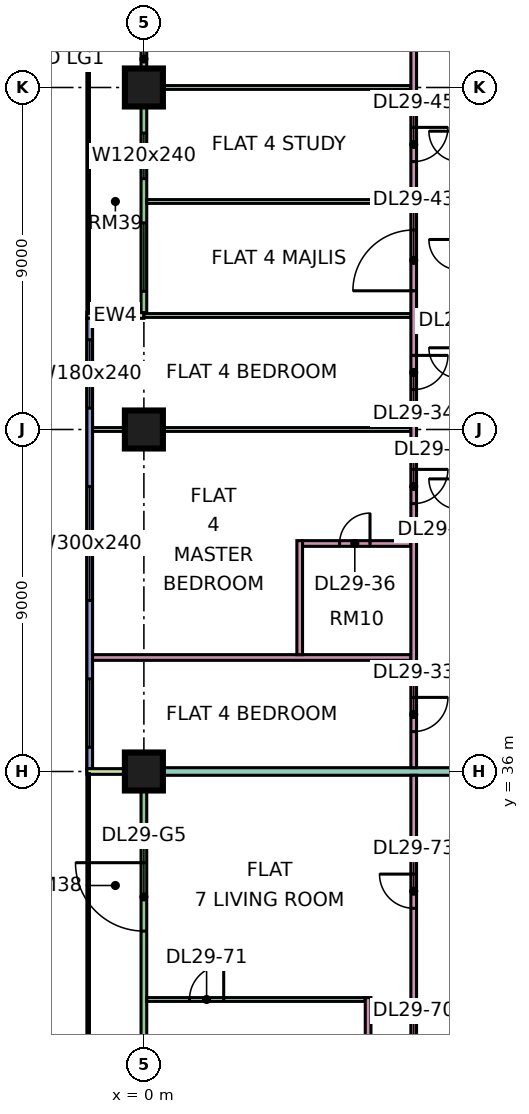
"""IFC4 building model, lengths in metres.
Left out: names, types, materials, properties, quantities, classifications, styles, units other than length and angle.
Written with IfcOpenShell. Run it as: python <this file> out.ifc"""

import sys

from ifc_helpers import new_model, si_unit, direction, frame, frame_2d, origin, origin_2d, place, context, subcontext, project, spatial, rectangle, extrude, element, fill, save


model = new_model("IFC4")
c1 = context("Model", 3, precision=1e-05, world=origin(), true_north=direction((0.0, 1.0)))
c2 = subcontext(c1, "Body", "Model", "MODEL_VIEW")
j1 = project(units=[si_unit("LENGTHUNIT", "METRE"), si_unit("PLANEANGLEUNIT", "RADIAN")], contexts=[c1])
p1 = place(None, origin())
s1 = spatial("IfcSite", under=j1, at=p1, CompositionType="ELEMENT")
p2 = place(p1, origin())
s2 = spatial("IfcBuilding", under=s1, at=p2, CompositionType="ELEMENT")
p3 = place(p2, frame((0.0, 0.0, 125.65)))
s3 = spatial("IfcBuildingStorey", under=s2, at=p3, CompositionType="ELEMENT", Elevation=125.65)
p4 = place(p3, frame((0.0, 36.0, 0.0), z_axis=(0.0, 0.0, 1.0), x_axis=(1.0, 0.0, 0.0)))
e1 = element("IfcColumn", 1, at=p4, inside=s3, PredefinedType="COLUMN", context=c2, shape_type="SweptSolid", body=[
    extrude(rectangle(XDim=1.0, YDim=1.0, at=origin_2d()), origin(), (0.0, 0.0, 1.0), 3.75),
])
for number, where, z_axis, x_axis in (
    (2, (0.0, 45.0, 0.0), (0.0, 0.0, 1.0), (1.0, 0.0, 0.0)),
    (3, (0.0, 54.0, 0.0), (0.0, 0.0, 1.0), (1.0, 0.0, 0.0)),
):
    element("IfcColumn", number, at=place(p3, frame(where, z_axis=z_axis, x_axis=x_axis)), inside=s3, PredefinedType="COLUMN", context=c2, shape_type="SweptSolid", body=[
        extrude(rectangle(XDim=1.0, YDim=1.0, at=origin_2d()), origin(), (0.0, 0.0, 1.0), 3.75),
    ])
p5 = place(p3, frame((0.0, 61.425, 0.0), z_axis=(0.0, 0.0, 1.0), x_axis=(0.0, -1.0, 0.0)))
e4 = element("IfcWall", 4, at=p5, inside=s3, PredefinedType="SOLIDWALL", context=c2, shape_type="SweptSolid", body=[
    extrude(rectangle(XDim=13.35, YDim=0.15, at=frame_2d((6.675, 0.0))), origin(), (0.0, 0.0, 1.0), 3.35),
])
p6 = place(p5, frame((0.262, 0.0, 0.45)))
e5 = element("IfcOpeningElement", 5, at=p6, cuts=e4, PredefinedType="OPENING", context=c2, shape_type="SweptSolid", body=[
    extrude(rectangle(XDim=0.9, YDim=2.4, at=frame_2d((0.45, 1.2))), frame((0.0, 0.085, 0.0), z_axis=(0.0, -1.0, 0.0), x_axis=(1.0, 0.0, 0.0)), (0.0, 0.0, 1.0), 0.17),
])
p7 = place(p5, frame((3.225, 0.0, 0.0)))
e6 = element("IfcOpeningElement", 6, at=p7, cuts=e4, PredefinedType="OPENING", context=c2, shape_type="SweptSolid", body=[
    extrude(rectangle(XDim=1.8, YDim=2.4, at=frame_2d((0.9, 1.2))), frame((0.0, 0.085, 0.0), z_axis=(0.0, -1.0, 0.0), x_axis=(1.0, 0.0, 0.0)), (0.0, 0.0, 1.0), 0.17),
])
p8 = place(p5, frame((8.625, 0.0, 0.45)))
e7 = element("IfcOpeningElement", 7, at=p8, cuts=e4, PredefinedType="OPENING", context=c2, shape_type="SweptSolid", body=[
    extrude(rectangle(XDim=1.2, YDim=2.4, at=frame_2d((0.6, 1.2))), frame((0.0, 0.085, 0.0), z_axis=(0.0, -1.0, 0.0), x_axis=(1.0, 0.0, 0.0)), (0.0, 0.0, 1.0), 0.17),
])
p9 = place(p5, frame((10.988, 0.0, 0.45)))
e8 = element("IfcOpeningElement", 8, at=p9, cuts=e4, PredefinedType="OPENING", context=c2, shape_type="SweptSolid", body=[
    extrude(rectangle(XDim=1.8, YDim=2.4, at=frame_2d((0.9, 1.2))), frame((0.0, 0.085, 0.0), z_axis=(0.0, -1.0, 0.0), x_axis=(1.0, 0.0, 0.0)), (0.0, 0.0, 1.0), 0.17),
])
p10 = place(p3, frame((-1.5, 48.0, 0.0), z_axis=(0.0, 0.0, 1.0), x_axis=(1.0, 0.0, 0.0)))
e9 = element("IfcWall", 9, at=p10, inside=s3, PredefinedType="SOLIDWALL", context=c2, shape_type="SweptSolid", body=[
    extrude(rectangle(XDim=1.5, YDim=0.15, at=frame_2d((0.75, 0.0))), origin(), (0.0, 0.0, 1.0), 3.35),
])
p11 = place(p3, frame((-1.425, 47.925, 0.0), z_axis=(0.0, 0.0, 1.0), x_axis=(0.0, -1.0, 0.0)))
e10 = element("IfcWall", 10, at=p11, inside=s3, PredefinedType="SOLIDWALL", context=c2, shape_type="SweptSolid", body=[
    extrude(rectangle(XDim=11.85, YDim=0.15, at=frame_2d((5.925, 0.0))), origin(), (0.0, 0.0, 1.0), 3.35),
])
p12 = place(p11, frame((0.562, 0.0, 0.45)))
e11 = element("IfcOpeningElement", 11, at=p12, cuts=e10, PredefinedType="OPENING", context=c2, shape_type="SweptSolid", body=[
    extrude(rectangle(XDim=1.8, YDim=2.4, at=frame_2d((0.9, 1.2))), frame((0.0, 0.085, 0.0), z_axis=(0.0, -1.0, 0.0), x_axis=(1.0, 0.0, 0.0)), (0.0, 0.0, 1.0), 0.17),
])
p13 = place(p11, frame((4.425, 0.0, 0.45)))
e12 = element("IfcOpeningElement", 12, at=p13, cuts=e10, PredefinedType="OPENING", context=c2, shape_type="SweptSolid", body=[
    extrude(rectangle(XDim=3.0, YDim=2.4, at=frame_2d((1.5, 1.2))), frame((0.0, 0.085, 0.0), z_axis=(0.0, -1.0, 0.0), x_axis=(1.0, 0.0, 0.0)), (0.0, 0.0, 1.0), 0.17),
])
p14 = place(p11, frame((9.488, 0.0, 0.45)))
e13 = element("IfcOpeningElement", 13, at=p14, cuts=e10, PredefinedType="OPENING", context=c2, shape_type="SweptSolid", body=[
    extrude(rectangle(XDim=1.8, YDim=2.4, at=frame_2d((0.9, 1.2))), frame((0.0, 0.085, 0.0), z_axis=(0.0, -1.0, 0.0), x_axis=(1.0, 0.0, 0.0)), (0.0, 0.0, 1.0), 0.17),
])
p15 = place(p3, frame((0.0, 35.925, 0.0), z_axis=(0.0, 0.0, 1.0), x_axis=(0.0, -1.0, 0.0)))
e14 = element("IfcWall", 14, at=p15, inside=s3, PredefinedType="SOLIDWALL", context=c2, shape_type="SweptSolid", body=[
    extrude(rectangle(XDim=11.85, YDim=0.15, at=frame_2d((5.925, 0.0))), origin(), (0.0, 0.0, 1.0), 3.35),
])
p16 = place(p15, frame((2.325, 0.0, 0.0)))
e15 = element("IfcOpeningElement", 15, at=p16, cuts=e14, PredefinedType="OPENING", context=c2, shape_type="SweptSolid", body=[
    extrude(rectangle(XDim=1.8, YDim=2.4, at=frame_2d((0.9, 1.2))), frame((0.0, 0.085, 0.0), z_axis=(0.0, -1.0, 0.0), x_axis=(1.0, 0.0, 0.0)), (0.0, 0.0, 1.0), 0.17),
])
p17 = place(p15, frame((7.125, 0.0, 0.45)))
e16 = element("IfcOpeningElement", 16, at=p17, cuts=e14, PredefinedType="OPENING", context=c2, shape_type="SweptSolid", body=[
    extrude(rectangle(XDim=3.0, YDim=2.4, at=frame_2d((1.5, 1.2))), frame((0.0, 0.085, 0.0), z_axis=(0.0, -1.0, 0.0), x_axis=(1.0, 0.0, 0.0)), (0.0, 0.0, 1.0), 0.17),
])
p18 = place(p3, frame((-1.5, 36.0, 0.0), z_axis=(0.0, 0.0, 1.0), x_axis=(1.0, 0.0, 0.0)))
e17 = element("IfcWall", 17, at=p18, inside=s3, PredefinedType="SOLIDWALL", context=c2, shape_type="SweptSolid", body=[
    extrude(rectangle(XDim=1.5, YDim=0.15, at=frame_2d((0.75, 0.0))), origin(), (0.0, 0.0, 1.0), 3.35),
])
p19 = place(p3, frame((-1.351, 39.0, 0.0), z_axis=(0.0, 0.0, 1.0), x_axis=(1.0, 0.0, 0.0)))
e18 = element("IfcWall", 18, at=p19, inside=s3, PredefinedType="PARTITIONING", context=c2, shape_type="SweptSolid", body=[
    extrude(rectangle(XDim=8.376, YDim=0.15, at=frame_2d((4.188, 0.0))), origin(), (0.0, 0.0, 1.0), 3.35),
])
p20 = place(p3, frame((-1.351, 45.0, 0.0), z_axis=(0.0, 0.0, 1.0), x_axis=(1.0, 0.0, 0.0)))
e19 = element("IfcWall", 19, at=p20, inside=s3, PredefinedType="PARTITIONING", context=c2, shape_type="SweptSolid", body=[
    extrude(rectangle(XDim=8.376, YDim=0.1, at=frame_2d((4.188, 0.0))), origin(), (0.0, 0.0, 1.0), 3.35),
])
e20 = element("IfcWall", 20, at=p4, inside=s3, PredefinedType="PARTITIONING", context=c2, shape_type="SweptSolid", body=[
    extrude(rectangle(XDim=12.4, YDim=0.2, at=frame_2d((6.2, 0.0))), origin(), (0.0, 0.0, 1.0), 3.35),
])
p21 = place(p3, frame((0.0, 48.0, 0.0), z_axis=(0.0, 0.0, 1.0), x_axis=(1.0, 0.0, 0.0)))
e21 = element("IfcWall", 21, at=p21, inside=s3, PredefinedType="PARTITIONING", context=c2, shape_type="SweptSolid", body=[
    extrude(rectangle(XDim=7.025, YDim=0.1, at=frame_2d((3.512, 0.0))), origin(), (0.0, 0.0, 1.0), 3.35),
])
p22 = place(p3, frame((0.074, 30.0, 0.0), z_axis=(0.0, 0.0, 1.0), x_axis=(1.0, 0.0, 0.0)))
e22 = element("IfcWall", 22, at=p22, inside=s3, PredefinedType="PARTITIONING", context=c2, shape_type="SweptSolid", body=[
    extrude(rectangle(XDim=5.751, YDim=0.1, at=frame_2d((2.875, 0.0))), origin(), (0.0, 0.0, 1.0), 3.35),
])
p23 = place(p22, frame((1.126, 0.0, 0.0)))
e23 = element("IfcOpeningElement", 23, at=p23, cuts=e22, PredefinedType="OPENING", context=c2, shape_type="SweptSolid", body=[
    extrude(rectangle(XDim=0.9, YDim=2.1, at=frame_2d((0.45, 1.05))), frame((0.0, 0.06, 0.0), z_axis=(0.0, -1.0, 0.0), x_axis=(1.0, 0.0, 0.0)), (0.0, 0.0, 1.0), 0.12),
])
for number, where, z_axis, x_axis in (
    (24, (0.074, 51.0, 0.0), (0.0, 0.0, 1.0), (1.0, 0.0, 0.0)),
    (25, (0.074, 54.0, 0.0), (0.0, 0.0, 1.0), (1.0, 0.0, 0.0)),
):
    element("IfcWall", number, at=place(p3, frame(where, z_axis=z_axis, x_axis=x_axis)), inside=s3, PredefinedType="PARTITIONING", context=c2, shape_type="SweptSolid", body=[
        extrude(rectangle(XDim=6.951, YDim=0.1, at=frame_2d((3.476, 0.0))), origin(), (0.0, 0.0, 1.0), 3.35),
    ])
p24 = place(p3, frame((4.1, 39.075, 0.0), z_axis=(0.0, 0.0, 1.0), x_axis=(0.0, 1.0, 0.0)))
e26 = element("IfcWall", 26, at=p24, inside=s3, PredefinedType="PARTITIONING", context=c2, shape_type="SweptSolid", body=[
    extrude(rectangle(XDim=3.0, YDim=0.15, at=frame_2d((1.5, 0.0))), origin(), (0.0, 0.0, 1.0), 3.35),
])
p25 = place(p3, frame((4.175, 42.0, 0.0), z_axis=(0.0, 0.0, 1.0), x_axis=(1.0, 0.0, 0.0)))
e27 = element("IfcWall", 27, at=p25, inside=s3, PredefinedType="PARTITIONING", context=c2, shape_type="SweptSolid", body=[
    extrude(rectangle(XDim=2.85, YDim=0.15, at=frame_2d((1.425, 0.0))), origin(), (0.0, 0.0, 1.0), 3.35),
])
p26 = place(p25, frame((0.975, 0.0, 0.0)))
e28 = element("IfcOpeningElement", 28, at=p26, cuts=e27, PredefinedType="OPENING", context=c2, shape_type="SweptSolid", body=[
    extrude(rectangle(XDim=0.8, YDim=2.1, at=frame_2d((0.4, 1.05))), frame((0.0, 0.085, 0.0), z_axis=(0.0, -1.0, 0.0), x_axis=(1.0, 0.0, 0.0)), (0.0, 0.0, 1.0), 0.17),
])
p27 = place(p3, frame((5.9, 22.5, 0.0), z_axis=(0.0, 0.0, 1.0), x_axis=(0.0, 1.0, 0.0)))
e29 = element("IfcWall", 29, at=p27, inside=s3, PredefinedType="PARTITIONING", context=c2, shape_type="SweptSolid", body=[
    extrude(rectangle(XDim=7.55, YDim=0.15, at=frame_2d((3.775, 0.0))), origin(), (0.0, 0.0, 1.0), 3.35),
])
p28 = place(p3, frame((7.1, 27.525, 0.0), z_axis=(0.0, 0.0, 1.0), x_axis=(0.0, 1.0, 0.0)))
e30 = element("IfcWall", 30, at=p28, inside=s3, PredefinedType="PARTITIONING", context=c2, shape_type="SweptSolid", body=[
    extrude(rectangle(XDim=8.375, YDim=0.15, at=frame_2d((4.188, 0.0))), origin(), (0.0, 0.0, 1.0), 3.35),
])
p29 = place(p28, frame((0.675, 0.0, 0.0)))
e31 = element("IfcOpeningElement", 31, at=p29, cuts=e30, PredefinedType="OPENING", context=c2, shape_type="SweptSolid", body=[
    extrude(rectangle(XDim=0.8, YDim=2.1, at=frame_2d((0.4, 1.05))), frame((0.0, 0.085, 0.0), z_axis=(0.0, -1.0, 0.0), x_axis=(1.0, 0.0, 0.0)), (0.0, 0.0, 1.0), 0.17),
])
p30 = place(p28, frame((4.875, 0.0, 0.0)))
e32 = element("IfcOpeningElement", 32, at=p30, cuts=e30, PredefinedType="OPENING", context=c2, shape_type="SweptSolid", body=[
    extrude(rectangle(XDim=0.9, YDim=2.1, at=frame_2d((0.45, 1.05))), frame((0.0, 0.085, 0.0), z_axis=(0.0, -1.0, 0.0), x_axis=(1.0, 0.0, 0.0)), (0.0, 0.0, 1.0), 0.17),
])
p31 = place(p3, frame((7.1, 36.1, 0.0), z_axis=(0.0, 0.0, 1.0), x_axis=(0.0, 1.0, 0.0)))
e33 = element("IfcWall", 33, at=p31, inside=s3, PredefinedType="PARTITIONING", context=c2, shape_type="SweptSolid", body=[
    extrude(rectangle(XDim=26.826, YDim=0.15, at=frame_2d((13.413, 0.0))), origin(), (0.0, 0.0, 1.0), 3.35),
])
p32 = place(p31, frame((0.95, 0.0, 0.0)))
e34 = element("IfcOpeningElement", 34, at=p32, cuts=e33, PredefinedType="OPENING", context=c2, shape_type="SweptSolid", body=[
    extrude(rectangle(XDim=0.9, YDim=2.1, at=frame_2d((0.45, 1.05))), frame((0.0, 0.085, 0.0), z_axis=(0.0, -1.0, 0.0), x_axis=(1.0, 0.0, 0.0)), (0.0, 0.0, 1.0), 0.17),
])
p33 = place(p31, frame((9.95, 0.0, 0.0)))
e35 = element("IfcOpeningElement", 35, at=p33, cuts=e33, PredefinedType="OPENING", context=c2, shape_type="SweptSolid", body=[
    extrude(rectangle(XDim=0.9, YDim=2.1, at=frame_2d((0.45, 1.05))), frame((0.0, 0.085, 0.0), z_axis=(0.0, -1.0, 0.0), x_axis=(1.0, 0.0, 0.0)), (0.0, 0.0, 1.0), 0.17),
])
p34 = place(p31, frame((6.95, 0.0, 0.0)))
e36 = element("IfcOpeningElement", 36, at=p34, cuts=e33, PredefinedType="OPENING", context=c2, shape_type="SweptSolid", body=[
    extrude(rectangle(XDim=0.9, YDim=2.1, at=frame_2d((0.45, 1.05))), frame((0.0, 0.085, 0.0), z_axis=(0.0, -1.0, 0.0), x_axis=(1.0, 0.0, 0.0)), (0.0, 0.0, 1.0), 0.17),
])
p35 = place(p31, frame((20.45, 0.0, 0.0)))
e37 = element("IfcOpeningElement", 37, at=p35, cuts=e33, PredefinedType="OPENING", context=c2, shape_type="SweptSolid", body=[
    extrude(rectangle(XDim=0.9, YDim=2.1, at=frame_2d((0.45, 1.05))), frame((0.0, 0.085, 0.0), z_axis=(0.0, -1.0, 0.0), x_axis=(1.0, 0.0, 0.0)), (0.0, 0.0, 1.0), 0.17),
])
p36 = place(p31, frame((25.8, 0.0, 0.0)))
e38 = element("IfcOpeningElement", 38, at=p36, cuts=e33, PredefinedType="OPENING", context=c2, shape_type="SweptSolid", body=[
    extrude(rectangle(XDim=0.8, YDim=2.1, at=frame_2d((0.4, 1.05))), frame((0.0, 0.085, 0.0), z_axis=(0.0, -1.0, 0.0), x_axis=(1.0, 0.0, 0.0)), (0.0, 0.0, 1.0), 0.17),
])
p37 = place(p31, frame((12.55, 0.0, 0.0)))
e39 = element("IfcOpeningElement", 39, at=p37, cuts=e33, PredefinedType="OPENING", context=c2, shape_type="SweptSolid", body=[
    extrude(rectangle(XDim=1.6, YDim=2.1, at=frame_2d((0.8, 1.05))), frame((0.0, 0.085, 0.0), z_axis=(0.0, -1.0, 0.0), x_axis=(1.0, 0.0, 0.0)), (0.0, 0.0, 1.0), 0.17),
])
p38 = place(p31, frame((15.95, 0.0, 0.0)))
e40 = element("IfcOpeningElement", 40, at=p38, cuts=e33, PredefinedType="OPENING", context=c2, shape_type="SweptSolid", body=[
    extrude(rectangle(XDim=0.9, YDim=2.1, at=frame_2d((0.45, 1.05))), frame((0.0, 0.085, 0.0), z_axis=(0.0, -1.0, 0.0), x_axis=(1.0, 0.0, 0.0)), (0.0, 0.0, 1.0), 0.17),
])
p39 = place(p3, frame((7.175, 29.7, 0.0), z_axis=(0.0, 0.0, 1.0), x_axis=(1.0, 0.0, 0.0)))
e41 = element("IfcWall", 41, at=p39, inside=s3, PredefinedType="PARTITIONING", context=c2, shape_type="SweptSolid", body=[
    extrude(rectangle(XDim=5.225, YDim=0.15, at=frame_2d((2.612, 0.0))), origin(), (0.0, 0.0, 1.0), 3.35),
])
p40 = place(p8, origin())
e42 = element("IfcWindow", 42, at=p40, inside=s3, PartitioningType="SINGLE_PANEL", PredefinedType="WINDOW", context=c2, shape_type="SweptSolid", body=[
    extrude(rectangle(XDim=1.2, YDim=2.4, at=frame_2d((0.6, 1.2))), frame((0.0, 0.03, 0.0), z_axis=(0.0, -1.0, 0.0), x_axis=(1.0, 0.0, 0.0)), (0.0, 0.0, 1.0), 0.06),
])
fill(e7, e42)
p41 = place(p9, origin())
e43 = element("IfcWindow", 43, at=p41, inside=s3, PartitioningType="SINGLE_PANEL", PredefinedType="WINDOW", context=c2, shape_type="SweptSolid", body=[
    extrude(rectangle(XDim=1.8, YDim=2.4, at=frame_2d((0.9, 1.2))), frame((0.0, 0.03, 0.0), z_axis=(0.0, -1.0, 0.0), x_axis=(1.0, 0.0, 0.0)), (0.0, 0.0, 1.0), 0.06),
])
fill(e8, e43)
p42 = place(p12, origin())
e44 = element("IfcWindow", 44, at=p42, inside=s3, PartitioningType="SINGLE_PANEL", PredefinedType="WINDOW", context=c2, shape_type="SweptSolid", body=[
    extrude(rectangle(XDim=1.8, YDim=2.4, at=frame_2d((0.9, 1.2))), frame((0.0, 0.03, 0.0), z_axis=(0.0, -1.0, 0.0), x_axis=(1.0, 0.0, 0.0)), (0.0, 0.0, 1.0), 0.06),
])
fill(e11, e44)
p43 = place(p13, origin())
e45 = element("IfcWindow", 45, at=p43, inside=s3, PartitioningType="SINGLE_PANEL", PredefinedType="WINDOW", context=c2, shape_type="SweptSolid", body=[
    extrude(rectangle(XDim=3.0, YDim=2.4, at=frame_2d((1.5, 1.2))), frame((0.0, 0.03, 0.0), z_axis=(0.0, -1.0, 0.0), x_axis=(1.0, 0.0, 0.0)), (0.0, 0.0, 1.0), 0.06),
])
fill(e12, e45)
p44 = place(p14, origin())
e46 = element("IfcWindow", 46, at=p44, inside=s3, PartitioningType="SINGLE_PANEL", PredefinedType="WINDOW", context=c2, shape_type="SweptSolid", body=[
    extrude(rectangle(XDim=1.8, YDim=2.4, at=frame_2d((0.9, 1.2))), frame((0.0, 0.03, 0.0), z_axis=(0.0, -1.0, 0.0), x_axis=(1.0, 0.0, 0.0)), (0.0, 0.0, 1.0), 0.06),
])
fill(e13, e46)
p45 = place(p16, frame((1.8, 0.0, 0.0), z_axis=(0.0, 0.0, 1.0), x_axis=(-1.0, 0.0, 0.0)))
e47 = element("IfcDoor", 47, at=p45, inside=s3, OperationType="DOUBLE_DOOR_SINGLE_SWING", PredefinedType="DOOR", context=c2, shape_type="SweptSolid", body=[
    extrude(rectangle(XDim=1.8, YDim=2.4, at=frame_2d((0.9, 1.2))), frame((0.0, 0.025, 0.0), z_axis=(0.0, -1.0, 0.0), x_axis=(1.0, 0.0, 0.0)), (0.0, 0.0, 1.0), 0.05),
])
fill(e15, e47)
p46 = place(p32, origin())
e48 = element("IfcDoor", 48, at=p46, inside=s3, OperationType="SINGLE_SWING_RIGHT", PredefinedType="DOOR", context=c2, shape_type="SweptSolid", body=[
    extrude(rectangle(XDim=0.9, YDim=2.1, at=frame_2d((0.45, 1.05))), frame((0.0, 0.025, 0.0), z_axis=(0.0, -1.0, 0.0), x_axis=(1.0, 0.0, 0.0)), (0.0, 0.0, 1.0), 0.05),
])
fill(e34, e48)
p47 = place(p33, origin())
e49 = element("IfcDoor", 49, at=p47, inside=s3, OperationType="SINGLE_SWING_RIGHT", PredefinedType="DOOR", context=c2, shape_type="SweptSolid", body=[
    extrude(rectangle(XDim=0.9, YDim=2.1, at=frame_2d((0.45, 1.05))), frame((0.0, 0.025, 0.0), z_axis=(0.0, -1.0, 0.0), x_axis=(1.0, 0.0, 0.0)), (0.0, 0.0, 1.0), 0.05),
])
fill(e35, e49)
p48 = place(p34, origin())
e50 = element("IfcDoor", 50, at=p48, inside=s3, OperationType="SINGLE_SWING_RIGHT", PredefinedType="DOOR", context=c2, shape_type="SweptSolid", body=[
    extrude(rectangle(XDim=0.9, YDim=2.1, at=frame_2d((0.45, 1.05))), frame((0.0, 0.025, 0.0), z_axis=(0.0, -1.0, 0.0), x_axis=(1.0, 0.0, 0.0)), (0.0, 0.0, 1.0), 0.05),
])
fill(e36, e50)
p49 = place(p26, frame((0.8, 0.0, 0.0), z_axis=(0.0, 0.0, 1.0), x_axis=(-1.0, 0.0, 0.0)))
e51 = element("IfcDoor", 51, at=p49, inside=s3, OperationType="SINGLE_SWING_RIGHT", PredefinedType="DOOR", context=c2, shape_type="SweptSolid", body=[
    extrude(rectangle(XDim=0.8, YDim=2.1, at=frame_2d((0.4, 1.05))), frame((0.0, 0.025, 0.0), z_axis=(0.0, -1.0, 0.0), x_axis=(1.0, 0.0, 0.0)), (0.0, 0.0, 1.0), 0.05),
])
fill(e28, e51)
p50 = place(p37, origin())
e52 = element("IfcDoor", 52, at=p50, inside=s3, OperationType="DOUBLE_DOOR_SINGLE_SWING", PredefinedType="DOOR", context=c2, shape_type="SweptSolid", body=[
    extrude(rectangle(XDim=1.6, YDim=2.1, at=frame_2d((0.8, 1.05))), frame((0.0, 0.025, 0.0), z_axis=(0.0, -1.0, 0.0), x_axis=(1.0, 0.0, 0.0)), (0.0, 0.0, 1.0), 0.05),
])
fill(e39, e52)
p51 = place(p38, origin())
e53 = element("IfcDoor", 53, at=p51, inside=s3, OperationType="SINGLE_SWING_RIGHT", PredefinedType="DOOR", context=c2, shape_type="SweptSolid", body=[
    extrude(rectangle(XDim=0.9, YDim=2.1, at=frame_2d((0.45, 1.05))), frame((0.0, 0.025, 0.0), z_axis=(0.0, -1.0, 0.0), x_axis=(1.0, 0.0, 0.0)), (0.0, 0.0, 1.0), 0.05),
])
fill(e40, e53)
p52 = place(p23, frame((0.9, 0.0, 0.0), z_axis=(0.0, 0.0, 1.0), x_axis=(-1.0, 0.0, 0.0)))
e54 = element("IfcDoor", 54, at=p52, inside=s3, OperationType="SINGLE_SWING_RIGHT", PredefinedType="DOOR", context=c2, shape_type="SweptSolid", body=[
    extrude(rectangle(XDim=0.9, YDim=2.1, at=frame_2d((0.45, 1.05))), frame((0.0, 0.025, 0.0), z_axis=(0.0, -1.0, 0.0), x_axis=(1.0, 0.0, 0.0)), (0.0, 0.0, 1.0), 0.05),
])
fill(e23, e54)
p53 = place(p30, frame((0.9, 0.0, 0.0), z_axis=(0.0, 0.0, 1.0), x_axis=(-1.0, 0.0, 0.0)))
e55 = element("IfcDoor", 55, at=p53, inside=s3, OperationType="SINGLE_SWING_RIGHT", PredefinedType="DOOR", context=c2, shape_type="SweptSolid", body=[
    extrude(rectangle(XDim=0.9, YDim=2.1, at=frame_2d((0.45, 1.05))), frame((0.0, 0.025, 0.0), z_axis=(0.0, -1.0, 0.0), x_axis=(1.0, 0.0, 0.0)), (0.0, 0.0, 1.0), 0.05),
])
fill(e32, e55)
save(model, sys.argv[1])
